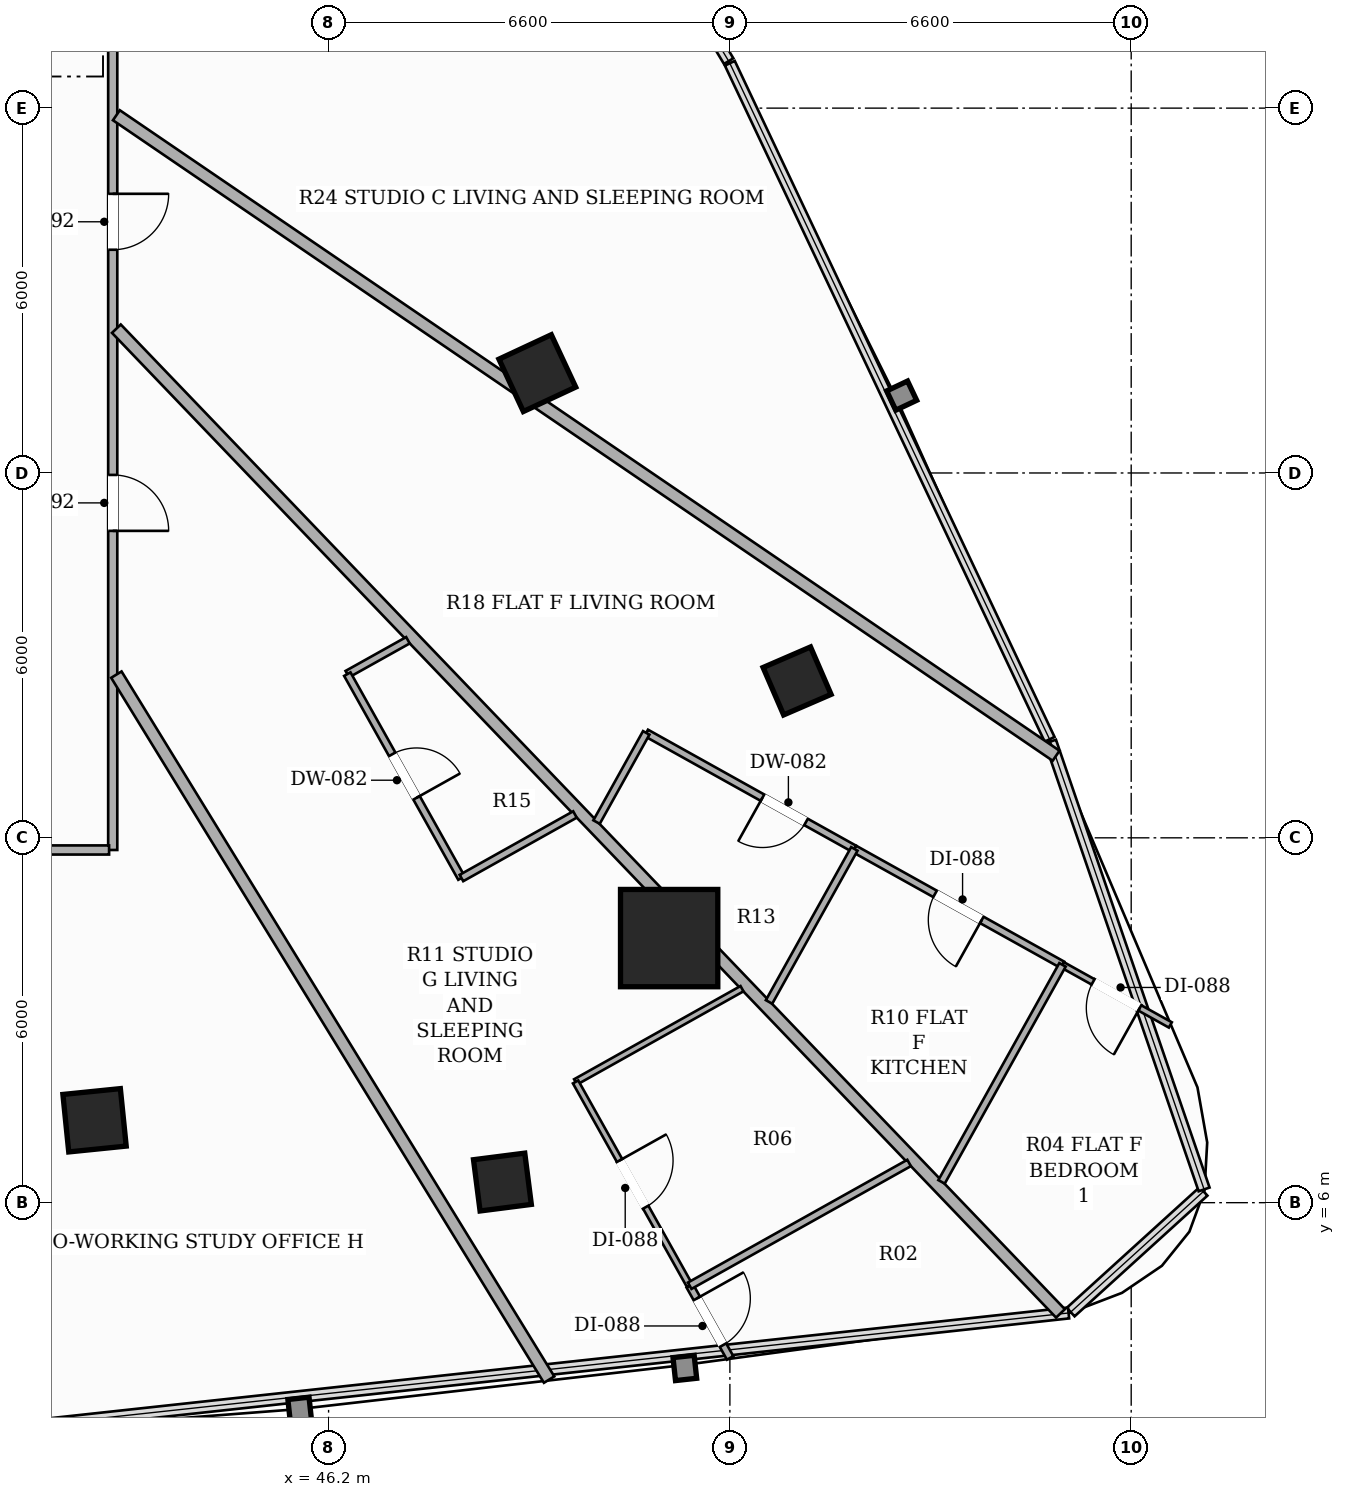
"""IFC4 building model, lengths in metres.
Left out: names, types, materials, properties, quantities, classifications, styles, units other than length and angle.
Written with IfcOpenShell. Run it as: python <this file> out.ifc"""

import sys

from ifc_helpers import new_model, si_unit, direction, frame, frame_2d, origin, origin_2d, place, context, subcontext, project, spatial, rectangle, hollow_rectangle, extrude, element, fill, save


model = new_model("IFC4")
c1 = context("Model", 3, precision=1e-05, world=origin(), true_north=direction((0.0, 1.0)))
c2 = subcontext(c1, "Body", "Model", "MODEL_VIEW")
j1 = project(units=[si_unit("LENGTHUNIT", "METRE"), si_unit("PLANEANGLEUNIT", "RADIAN")], contexts=[c1])
p1 = place(None, origin())
s1 = spatial("IfcSite", under=j1, at=p1, CompositionType="ELEMENT")
p2 = place(p1, origin())
s2 = spatial("IfcBuilding", under=s1, at=p2, CompositionType="ELEMENT")
p3 = place(p2, frame((0.0, 0.0, 80.75)))
s3 = spatial("IfcBuildingStorey", under=s2, at=p3, CompositionType="ELEMENT", Elevation=80.75)
p4 = place(p3, frame((51.801, 10.351, 0.0), z_axis=(0.0, 0.0, 1.0), x_axis=(1.0, 0.0, 0.0)))
e1 = element("IfcColumn", 1, at=p4, inside=s3, PredefinedType="COLUMN", context=c2, shape_type="SweptSolid", body=[
    extrude(hollow_rectangle(XDim=1.6, YDim=1.6, WallThickness=0.05, at=origin_2d()), origin(), (0.0, 0.0, 1.0), 3.3),
])
for number, where, z_axis, x_axis in (
    (2, (42.351, 7.355, 0.0), (0.0, 0.0, 1.0), (0.995, 0.101, 0.0)),
    (3, (49.633, 19.642, 0.0), (0.0, 0.0, 1.0), (-0.423, 0.906, 0.0)),
):
    element("IfcColumn", number, at=place(p3, frame(where, z_axis=z_axis, x_axis=x_axis)), inside=s3, PredefinedType="COLUMN", context=c2, shape_type="SweptSolid", body=[
        extrude(hollow_rectangle(XDim=0.95, YDim=0.95, WallThickness=0.032, at=origin_2d()), origin(), (0.0, 0.0, 1.0), 3.3),
    ])
for number, where, z_axis, x_axis in (
    (4, (49.059, 6.339, 0.0), (0.0, 0.0, 1.0), (0.992, 0.127, 0.0)),
    (5, (53.905, 14.58, 0.0), (0.0, 0.0, 1.0), (-0.397, 0.918, 0.0)),
):
    element("IfcColumn", number, at=place(p3, frame(where, z_axis=z_axis, x_axis=x_axis)), inside=s3, PredefinedType="COLUMN", context=c2, shape_type="SweptSolid", body=[
        extrude(hollow_rectangle(XDim=0.85, YDim=0.85, WallThickness=0.028, at=origin_2d()), origin(), (0.0, 0.0, 1.0), 3.3),
    ])
p5 = place(p3, frame((42.65, 36.84, 0.0), z_axis=(0.0, 0.0, 1.0), x_axis=(0.0, -1.0, 0.0)))
e6 = element("IfcWall", 6, at=p5, inside=s3, PredefinedType="PARTITIONING", context=c2, shape_type="SweptSolid", body=[
    extrude(rectangle(XDim=25.04, YDim=0.15, at=frame_2d((12.52, 0.0))), origin(), (0.0, 0.0, 1.0), 2.413),
])
p6 = place(p5, frame((6.171, 0.0, 0.0)))
e7 = element("IfcOpeningElement", 7, at=p6, cuts=e6, PredefinedType="OPENING", context=c2, shape_type="SweptSolid", body=[
    extrude(rectangle(XDim=0.92, YDim=2.15, at=frame_2d((0.46, 1.075))), frame((0.0, 0.085, 0.0), z_axis=(0.0, -1.0, 0.0), x_axis=(1.0, 0.0, 0.0)), (0.0, 0.0, 1.0), 0.17),
])
p7 = place(p5, frame((14.249, 0.0, 0.0)))
e8 = element("IfcOpeningElement", 8, at=p7, cuts=e6, PredefinedType="OPENING", context=c2, shape_type="SweptSolid", body=[
    extrude(rectangle(XDim=0.92, YDim=2.15, at=frame_2d((0.46, 1.075))), frame((0.0, 0.085, 0.0), z_axis=(0.0, -1.0, 0.0), x_axis=(1.0, 0.0, 0.0)), (0.0, 0.0, 1.0), 0.17),
])
p8 = place(p5, frame((18.872, 0.0, 0.0)))
e9 = element("IfcOpeningElement", 9, at=p8, cuts=e6, PredefinedType="OPENING", context=c2, shape_type="SweptSolid", body=[
    extrude(rectangle(XDim=0.92, YDim=2.15, at=frame_2d((0.46, 1.075))), frame((0.0, 0.085, 0.0), z_axis=(0.0, -1.0, 0.0), x_axis=(1.0, 0.0, 0.0)), (0.0, 0.0, 1.0), 0.17),
])
p9 = place(p3, frame((42.59, 11.8, 0.0), z_axis=(0.0, 0.0, 1.0), x_axis=(-1.0, 0.0, 0.0)))
e10 = element("IfcWall", 10, at=p9, inside=s3, PredefinedType="PARTITIONING", context=c2, shape_type="SweptSolid", body=[
    extrude(rectangle(XDim=19.24, YDim=0.15, at=frame_2d((9.62, 0.0))), origin(), (0.0, 0.0, 1.0), 2.669),
])
p10 = place(p9, frame((9.24, 0.0, 0.0)))
e11 = element("IfcOpeningElement", 11, at=p10, cuts=e10, PredefinedType="OPENING", context=c2, shape_type="SweptSolid", body=[
    extrude(rectangle(XDim=0.88, YDim=2.1, at=frame_2d((0.44, 1.05))), frame((0.0, 0.085, 0.0), z_axis=(0.0, -1.0, 0.0), x_axis=(1.0, 0.0, 0.0)), (0.0, 0.0, 1.0), 0.17),
])
p11 = place(p9, frame((2.174, 0.0, 0.0)))
e12 = element("IfcOpeningElement", 12, at=p11, cuts=e10, PredefinedType="OPENING", context=c2, shape_type="SweptSolid", body=[
    extrude(rectangle(XDim=0.88, YDim=2.1, at=frame_2d((0.44, 1.05))), frame((0.0, 0.085, 0.0), z_axis=(0.0, -1.0, 0.0), x_axis=(1.0, 0.0, 0.0)), (0.0, 0.0, 1.0), 0.17),
])
p12 = place(p3, frame((58.165, 13.35, 0.0), z_axis=(0.0, 0.0, 1.0), x_axis=(-0.826341659386, 0.563169123766, 0.0)))
e13 = element("IfcWall", 13, at=p12, inside=s3, PredefinedType="PARTITIONING", context=c2, shape_type="SweptSolid", body=[
    extrude(rectangle(XDim=18.703, YDim=0.2, at=frame_2d((9.352, 0.0))), origin(), (0.0, 0.0, 1.0), 2.413),
])
p13 = place(p3, frame((58.237, 4.179, 0.0), z_axis=(0.0, 0.0, 1.0), x_axis=(-0.69208567792, 0.721815360337, 0.0)))
e14 = element("IfcWall", 14, at=p13, inside=s3, PredefinedType="PARTITIONING", context=c2, shape_type="SweptSolid", body=[
    extrude(rectangle(XDim=22.435, YDim=0.2, at=frame_2d((11.218, 0.0))), origin(), (0.0, 0.0, 1.0), 2.413),
])
p14 = place(p3, frame((49.827, 3.09, 0.0), z_axis=(0.0, 0.0, 1.0), x_axis=(-0.523146880199, 0.852242536921, 0.0)))
e15 = element("IfcWall", 15, at=p14, inside=s3, PredefinedType="PARTITIONING", context=c2, shape_type="SweptSolid", body=[
    extrude(rectangle(XDim=13.604, YDim=0.2, at=frame_2d((6.802, 0.0))), origin(), (0.0, 0.0, 1.0), 2.413),
])
p15 = place(p3, frame((54.847, 11.818, 0.0), z_axis=(0.0, 0.0, 1.0), x_axis=(-0.87346578699, 0.486885529624, 0.0)))
e16 = element("IfcWall", 16, at=p15, inside=s3, PredefinedType="PARTITIONING", context=c2, shape_type="SweptSolid", body=[
    extrude(rectangle(XDim=3.919, YDim=0.12, at=frame_2d((1.959, 0.0))), origin(), (0.0, 0.0, 1.0), 2.413),
])
p16 = place(p15, frame((0.91, 0.0, 0.0)))
e17 = element("IfcOpeningElement", 17, at=p16, cuts=e16, PredefinedType="OPENING", context=c2, shape_type="SweptSolid", body=[
    extrude(rectangle(XDim=0.82, YDim=2.1, at=frame_2d((0.41, 1.05))), frame((0.0, 0.07, 0.0), z_axis=(0.0, -1.0, 0.0), x_axis=(1.0, 0.0, 0.0)), (0.0, 0.0, 1.0), 0.14),
])
p17 = place(p3, frame((51.424, 13.726, 0.0), z_axis=(0.0, 0.0, 1.0), x_axis=(-0.486605473044, -0.873621836726, 0.0)))
e18 = element("IfcWall", 18, at=p17, inside=s3, PredefinedType="PARTITIONING", context=c2, shape_type="SweptSolid", body=[
    extrude(rectangle(XDim=1.679, YDim=0.12, at=frame_2d((0.84, 0.0))), origin(), (0.0, 0.0, 1.0), 2.413),
])
p18 = place(p3, frame((58.27, 9.911, 0.0), z_axis=(0.0, 0.0, 1.0), x_axis=(-0.873560029318, 0.486716421727, 0.0)))
e19 = element("IfcWall", 19, at=p18, inside=s3, PredefinedType="PARTITIONING", context=c2, shape_type="SweptSolid", body=[
    extrude(rectangle(XDim=3.918, YDim=0.12, at=frame_2d((1.959, 0.0))), origin(), (0.0, 0.0, 1.0), 2.619),
])
p19 = place(p18, frame((1.519, 0.0, 0.0)))
e20 = element("IfcOpeningElement", 20, at=p19, cuts=e19, PredefinedType="OPENING", context=c2, shape_type="SweptSolid", body=[
    extrude(rectangle(XDim=0.88, YDim=2.1, at=frame_2d((0.44, 1.05))), frame((0.0, 0.07, 0.0), z_axis=(0.0, -1.0, 0.0), x_axis=(1.0, 0.0, 0.0)), (0.0, 0.0, 1.0), 0.14),
])
p20 = place(p3, frame((60.044, 8.923, 0.0), z_axis=(0.0, 0.0, 1.0), x_axis=(-0.873680423781, 0.486500274514, 0.0)))
e21 = element("IfcWall", 21, at=p20, inside=s3, PredefinedType="PARTITIONING", context=c2, shape_type="SweptSolid", body=[
    extrude(rectangle(XDim=2.031, YDim=0.1, at=frame_2d((1.015, 0.0))), origin(), (0.0, 0.0, 1.0), 3.06),
])
p21 = place(p20, frame((0.575, 0.0, 0.0)))
e22 = element("IfcOpeningElement", 22, at=p21, cuts=e21, PredefinedType="OPENING", context=c2, shape_type="SweptSolid", body=[
    extrude(rectangle(XDim=0.88, YDim=2.1, at=frame_2d((0.44, 1.05))), frame((0.0, 0.06, 0.0), z_axis=(0.0, -1.0, 0.0), x_axis=(1.0, 0.0, 0.0)), (0.0, 0.0, 1.0), 0.12),
])
p22 = place(p3, frame((54.847, 11.818, 0.0), z_axis=(0.0, 0.0, 1.0), x_axis=(-0.486822226103, -0.873501070504, 0.0)))
e23 = element("IfcWall", 23, at=p22, inside=s3, PredefinedType="PARTITIONING", context=c2, shape_type="SweptSolid", body=[
    extrude(rectangle(XDim=2.882, YDim=0.12, at=frame_2d((1.441, 0.0))), origin(), (0.0, 0.0, 1.0), 3.06),
])
p23 = place(p3, frame((58.27, 9.911, 0.0), z_axis=(0.0, 0.0, 1.0), x_axis=(-0.486824622959, -0.873499734677, 0.0)))
e24 = element("IfcWall", 24, at=p23, inside=s3, PredefinedType="PARTITIONING", context=c2, shape_type="SweptSolid", body=[
    extrude(rectangle(XDim=4.086, YDim=0.12, at=frame_2d((2.043, 0.0))), origin(), (0.0, 0.0, 1.0), 3.06),
])
p24 = place(p3, frame((47.505, 15.249, 0.0), z_axis=(0.0, 0.0, 1.0), x_axis=(-0.872914025969, -0.487874064967, 0.0)))
e25 = element("IfcWall", 25, at=p24, inside=s3, PredefinedType="PARTITIONING", context=c2, shape_type="SweptSolid", body=[
    extrude(rectangle(XDim=1.142, YDim=0.12, at=frame_2d((0.571, 0.0))), origin(), (0.0, 0.0, 1.0), 3.06),
])
p25 = place(p3, frame((46.508, 14.692, 0.0), z_axis=(0.0, 0.0, 1.0), x_axis=(0.488483407483, -0.872573183529, 0.0)))
e26 = element("IfcWall", 26, at=p25, inside=s3, PredefinedType="PARTITIONING", context=c2, shape_type="SweptSolid", body=[
    extrude(rectangle(XDim=3.843, YDim=0.12, at=frame_2d((1.921, 0.0))), origin(), (0.0, 0.0, 1.0), 3.06),
])
p26 = place(p25, frame((1.511, 0.0, 0.0)))
e27 = element("IfcOpeningElement", 27, at=p26, cuts=e26, PredefinedType="OPENING", context=c2, shape_type="SweptSolid", body=[
    extrude(rectangle(XDim=0.82, YDim=2.1, at=frame_2d((0.41, 1.05))), frame((0.0, 0.07, 0.0), z_axis=(0.0, -1.0, 0.0), x_axis=(1.0, 0.0, 0.0)), (0.0, 0.0, 1.0), 0.14),
])
p27 = place(p3, frame((48.385, 11.339, 0.0), z_axis=(0.0, 0.0, 1.0), x_axis=(0.872618854318, 0.488401817246, 0.0)))
e28 = element("IfcWall", 28, at=p27, inside=s3, PredefinedType="PARTITIONING", context=c2, shape_type="SweptSolid", body=[
    extrude(rectangle(XDim=2.139, YDim=0.12, at=frame_2d((1.07, 0.0))), origin(), (0.0, 0.0, 1.0), 2.413),
])
p28 = place(p3, frame((52.139, 4.634, 0.0), z_axis=(0.0, 0.0, 1.0), x_axis=(0.488778203453, -0.872408085605, 0.0)))
e29 = element("IfcWall", 29, at=p28, inside=s3, PredefinedType="PARTITIONING", context=c2, shape_type="SweptSolid", body=[
    extrude(rectangle(XDim=1.361, YDim=0.12, at=frame_2d((0.68, 0.0))), origin(), (0.0, 0.0, 1.0), 2.619),
])
p29 = place(p28, frame((0.24, 0.0, 0.0)))
e30 = element("IfcOpeningElement", 30, at=p29, cuts=e29, PredefinedType="OPENING", context=c2, shape_type="SweptSolid", body=[
    extrude(rectangle(XDim=0.88, YDim=2.1, at=frame_2d((0.44, 1.05))), frame((0.0, 0.07, 0.0), z_axis=(0.0, -1.0, 0.0), x_axis=(1.0, 0.0, 0.0)), (0.0, 0.0, 1.0), 0.14),
])
p30 = place(p3, frame((52.999, 9.519, 0.0), z_axis=(0.0, 0.0, 1.0), x_axis=(-0.87247814598, -0.488653133406, 0.0)))
e31 = element("IfcWall", 31, at=p30, inside=s3, PredefinedType="PARTITIONING", context=c2, shape_type="SweptSolid", body=[
    extrude(rectangle(XDim=3.137, YDim=0.1, at=frame_2d((1.569, 0.0))), origin(), (0.0, 0.0, 1.0), 2.413),
])
p31 = place(p3, frame((50.262, 7.986, 0.0), z_axis=(0.0, 0.0, 1.0), x_axis=(0.488564666262, -0.872527688317, 0.0)))
e32 = element("IfcWall", 32, at=p31, inside=s3, PredefinedType="PARTITIONING", context=c2, shape_type="SweptSolid", body=[
    extrude(rectangle(XDim=3.842, YDim=0.1, at=frame_2d((1.921, 0.0))), origin(), (0.0, 0.0, 1.0), 2.413),
])
p32 = place(p31, frame((1.481, 0.0, 0.0)))
e33 = element("IfcOpeningElement", 33, at=p32, cuts=e32, PredefinedType="OPENING", context=c2, shape_type="SweptSolid", body=[
    extrude(rectangle(XDim=0.88, YDim=2.1, at=frame_2d((0.44, 1.05))), frame((0.0, 0.06, 0.0), z_axis=(0.0, -1.0, 0.0), x_axis=(1.0, 0.0, 0.0)), (0.0, 0.0, 1.0), 0.12),
])
p33 = place(p3, frame((52.139, 4.634, 0.0), z_axis=(0.0, 0.0, 1.0), x_axis=(0.87266304729, 0.488322850064, 0.0)))
e34 = element("IfcWall", 34, at=p33, inside=s3, PredefinedType="PARTITIONING", context=c2, shape_type="SweptSolid", body=[
    extrude(rectangle(XDim=4.135, YDim=0.12, at=frame_2d((2.067, 0.0))), origin(), (0.0, 0.0, 1.0), 2.619),
])
p34 = place(p7, origin())
e35 = element("IfcDoor", 35, at=p34, inside=s3, OperationType="SINGLE_SWING_LEFT", PredefinedType="DOOR", context=c2, shape_type="SweptSolid", body=[
    extrude(rectangle(XDim=0.92, YDim=2.15, at=frame_2d((0.46, 1.075))), frame((0.0, 0.025, 0.0), z_axis=(0.0, -1.0, 0.0), x_axis=(1.0, 0.0, 0.0)), (0.0, 0.0, 1.0), 0.05),
])
fill(e8, e35)
p35 = place(p16, origin())
e36 = element("IfcDoor", 36, at=p35, inside=s3, OperationType="SINGLE_SWING_RIGHT", PredefinedType="DOOR", context=c2, shape_type="SweptSolid", body=[
    extrude(rectangle(XDim=0.82, YDim=2.1, at=frame_2d((0.41, 1.05))), frame((0.0, 0.025, 0.0), z_axis=(0.0, -1.0, 0.0), x_axis=(1.0, 0.0, 0.0)), (0.0, 0.0, 1.0), 0.05),
])
fill(e17, e36)
p36 = place(p19, origin())
e37 = element("IfcDoor", 37, at=p36, inside=s3, OperationType="SINGLE_SWING_LEFT", PredefinedType="DOOR", context=c2, shape_type="SweptSolid", body=[
    extrude(rectangle(XDim=0.88, YDim=2.1, at=frame_2d((0.44, 1.05))), frame((0.0, 0.025, 0.0), z_axis=(0.0, -1.0, 0.0), x_axis=(1.0, 0.0, 0.0)), (0.0, 0.0, 1.0), 0.05),
])
fill(e20, e37)
p37 = place(p21, origin())
e38 = element("IfcDoor", 38, at=p37, inside=s3, OperationType="SINGLE_SWING_LEFT", PredefinedType="DOOR", context=c2, shape_type="SweptSolid", body=[
    extrude(rectangle(XDim=0.88, YDim=2.1, at=frame_2d((0.44, 1.05))), frame((0.0, 0.025, 0.0), z_axis=(0.0, -1.0, 0.0), x_axis=(1.0, 0.0, 0.0)), (0.0, 0.0, 1.0), 0.05),
])
fill(e22, e38)
p38 = place(p8, origin())
e39 = element("IfcDoor", 39, at=p38, inside=s3, OperationType="SINGLE_SWING_RIGHT", PredefinedType="DOOR", context=c2, shape_type="SweptSolid", body=[
    extrude(rectangle(XDim=0.92, YDim=2.15, at=frame_2d((0.46, 1.075))), frame((0.0, 0.025, 0.0), z_axis=(0.0, -1.0, 0.0), x_axis=(1.0, 0.0, 0.0)), (0.0, 0.0, 1.0), 0.05),
])
fill(e9, e39)
p39 = place(p26, origin())
e40 = element("IfcDoor", 40, at=p39, inside=s3, OperationType="SINGLE_SWING_RIGHT", PredefinedType="DOOR", context=c2, shape_type="SweptSolid", body=[
    extrude(rectangle(XDim=0.82, YDim=2.1, at=frame_2d((0.41, 1.05))), frame((0.0, 0.025, 0.0), z_axis=(0.0, -1.0, 0.0), x_axis=(1.0, 0.0, 0.0)), (0.0, 0.0, 1.0), 0.05),
])
fill(e27, e40)
p40 = place(p29, origin())
e41 = element("IfcDoor", 41, at=p40, inside=s3, OperationType="SINGLE_SWING_LEFT", PredefinedType="DOOR", context=c2, shape_type="SweptSolid", body=[
    extrude(rectangle(XDim=0.88, YDim=2.1, at=frame_2d((0.44, 1.05))), frame((0.0, 0.025, 0.0), z_axis=(0.0, -1.0, 0.0), x_axis=(1.0, 0.0, 0.0)), (0.0, 0.0, 1.0), 0.05),
])
fill(e30, e41)
p41 = place(p32, origin())
e42 = element("IfcDoor", 42, at=p41, inside=s3, OperationType="SINGLE_SWING_LEFT", PredefinedType="DOOR", context=c2, shape_type="SweptSolid", body=[
    extrude(rectangle(XDim=0.88, YDim=2.1, at=frame_2d((0.44, 1.05))), frame((0.0, 0.025, 0.0), z_axis=(0.0, -1.0, 0.0), x_axis=(1.0, 0.0, 0.0)), (0.0, 0.0, 1.0), 0.05),
])
fill(e33, e42)
save(model, sys.argv[1])
